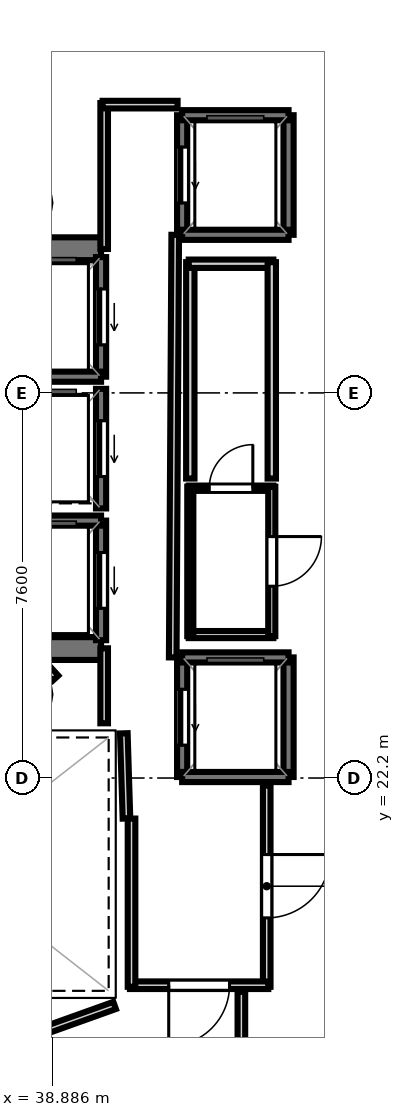
"""IFC4 building model, lengths in metres.
Left out: names, types, materials, properties, quantities, classifications, styles, units other than length and angle.
Written with IfcOpenShell. Run it as: python <this file> out.ifc"""

import sys

from ifc_helpers import new_model, si_unit, direction, frame, frame_2d, origin, place, context, subcontext, project, spatial, rectangle, extrude, element, fill, save


model = new_model("IFC4")
c1 = context("Model", 3, precision=1e-05, world=origin(), true_north=direction((0.0, 1.0)))
c2 = subcontext(c1, "Body", "Model", "MODEL_VIEW")
j1 = project(units=[si_unit("LENGTHUNIT", "METRE"), si_unit("PLANEANGLEUNIT", "RADIAN")], contexts=[c1])
p1 = place(None, origin())
s1 = spatial("IfcSite", under=j1, at=p1, CompositionType="ELEMENT")
p2 = place(p1, origin())
s2 = spatial("IfcBuilding", under=s1, at=p2, CompositionType="ELEMENT")
p3 = place(p2, frame((0.0, 0.0, 306.5)))
s3 = spatial("IfcBuildingStorey", under=s2, at=p3, CompositionType="ELEMENT", Elevation=306.5)
p4 = place(p3, frame((29.33, 32.645, 0.0), z_axis=(0.0, 0.0, 1.0), x_axis=(1.0, 0.0, 0.0)))
e1 = element("IfcWall", 1, at=p4, inside=s3, PredefinedType="SHEAR", context=c2, shape_type="SweptSolid", body=[
    extrude(rectangle(XDim=10.52, YDim=0.45, at=frame_2d((5.26, 0.0))), origin(), (0.0, 0.0, 1.0), 3.52),
])
p5 = place(p4, frame((0.895, 0.0, 0.0)))
e2 = element("IfcOpeningElement", 2, at=p5, cuts=e1, PredefinedType="OPENING", context=c2, shape_type="SweptSolid", body=[
    extrude(rectangle(XDim=1.25, YDim=2.15, at=frame_2d((0.625, 1.075))), frame((0.0, 0.235, 0.0), z_axis=(0.0, -1.0, 0.0), x_axis=(1.0, 0.0, 0.0)), (0.0, 0.0, 1.0), 0.47),
])
p6 = place(p3, frame((29.33, 24.755, 0.0), z_axis=(0.0, 0.0, 1.0), x_axis=(1.0, 0.0, 0.0)))
e3 = element("IfcWall", 3, at=p6, inside=s3, PredefinedType="SHEAR", context=c2, shape_type="SweptSolid", body=[
    extrude(rectangle(XDim=10.52, YDim=0.45, at=frame_2d((5.26, 0.0))), origin(), (0.0, 0.0, 1.0), 3.52),
])
p7 = place(p6, frame((0.695, 0.0, 0.0)))
e4 = element("IfcOpeningElement", 4, at=p7, cuts=e3, PredefinedType="OPENING", context=c2, shape_type="SweptSolid", body=[
    extrude(rectangle(XDim=1.25, YDim=2.15, at=frame_2d((0.625, 1.075))), frame((0.0, 0.235, 0.0), z_axis=(0.0, -1.0, 0.0), x_axis=(1.0, 0.0, 0.0)), (0.0, 0.0, 1.0), 0.47),
])
p8 = place(p3, frame((39.85, 30.12, 0.0), z_axis=(0.0, 0.0, 1.0), x_axis=(0.0, 1.0, 0.0)))
e5 = element("IfcWall", 5, at=p8, inside=s3, PredefinedType="SOLIDWALL", context=c2, shape_type="SweptSolid", body=[
    extrude(rectangle(XDim=2.36, YDim=0.2, at=frame_2d((1.18, 0.0))), origin(), (0.0, 0.0, 1.0), 3.52),
])
p9 = place(p8, frame((0.63, 0.0, 0.0)))
e6 = element("IfcOpeningElement", 6, at=p9, cuts=e5, PredefinedType="OPENING", context=c2, shape_type="SweptSolid", body=[
    extrude(rectangle(XDim=1.1, YDim=2.15, at=frame_2d((0.55, 1.075))), frame((0.0, 0.11, 0.0), z_axis=(0.0, -1.0, 0.0), x_axis=(1.0, 0.0, 0.0)), (0.0, 0.0, 1.0), 0.22),
])
p10 = place(p3, frame((37.75, 30.12, 0.0), z_axis=(0.0, 0.0, 1.0), x_axis=(1.0, 0.0, 0.0)))
e7 = element("IfcWall", 7, at=p10, inside=s3, PredefinedType="SOLIDWALL", context=c2, shape_type="SweptSolid", body=[
    extrude(rectangle(XDim=2.1, YDim=0.2, at=frame_2d((1.05, 0.0))), origin(), (0.0, 0.0, 1.0), 3.52),
])
p11 = place(p3, frame((39.85, 24.92, 0.0), z_axis=(0.0, 0.0, 1.0), x_axis=(0.0, 1.0, 0.0)))
e8 = element("IfcWall", 8, at=p11, inside=s3, PredefinedType="SOLIDWALL", context=c2, shape_type="SweptSolid", body=[
    extrude(rectangle(XDim=2.36, YDim=0.2, at=frame_2d((1.18, 0.0))), origin(), (0.0, 0.0, 1.0), 3.52),
])
p12 = place(p11, frame((0.63, 0.0, 0.0)))
e9 = element("IfcOpeningElement", 9, at=p12, cuts=e8, PredefinedType="OPENING", context=c2, shape_type="SweptSolid", body=[
    extrude(rectangle(XDim=1.1, YDim=2.15, at=frame_2d((0.55, 1.075))), frame((0.0, 0.11, 0.0), z_axis=(0.0, -1.0, 0.0), x_axis=(1.0, 0.0, 0.0)), (0.0, 0.0, 1.0), 0.22),
])
p13 = place(p3, frame((37.75, 27.28, 0.0), z_axis=(0.0, 0.0, 1.0), x_axis=(1.0, 0.0, 0.0)))
e10 = element("IfcWall", 10, at=p13, inside=s3, PredefinedType="SOLIDWALL", context=c2, shape_type="SweptSolid", body=[
    extrude(rectangle(XDim=2.1, YDim=0.2, at=frame_2d((1.05, 0.0))), origin(), (0.0, 0.0, 1.0), 3.52),
])
p14 = place(p3, frame((39.85, 27.52, 0.0), z_axis=(0.0, 0.0, 1.0), x_axis=(0.0, 1.0, 0.0)))
e11 = element("IfcWall", 11, at=p14, inside=s3, PredefinedType="SOLIDWALL", context=c2, shape_type="SweptSolid", body=[
    extrude(rectangle(XDim=2.36, YDim=0.2, at=frame_2d((1.18, 0.0))), origin(), (0.0, 0.0, 1.0), 3.52),
])
p15 = place(p14, frame((0.63, 0.0, 0.0)))
e12 = element("IfcOpeningElement", 12, at=p15, cuts=e11, PredefinedType="OPENING", context=c2, shape_type="SweptSolid", body=[
    extrude(rectangle(XDim=1.1, YDim=2.15, at=frame_2d((0.55, 1.075))), frame((0.0, 0.11, 0.0), z_axis=(0.0, -1.0, 0.0), x_axis=(1.0, 0.0, 0.0)), (0.0, 0.0, 1.0), 0.22),
])
p16 = place(p3, frame((43.55, 22.22, 0.0), z_axis=(0.0, 0.0, 1.0), x_axis=(0.0, 1.0, 0.0)))
e13 = element("IfcWall", 13, at=p16, inside=s3, PredefinedType="SOLIDWALL", context=c2, shape_type="SweptSolid", body=[
    extrude(rectangle(XDim=2.36, YDim=0.2, at=frame_2d((1.18, 0.0))), origin(), (0.0, 0.0, 1.0), 3.52),
])
p17 = place(p3, frame((41.45, 22.22, 0.0), z_axis=(0.0, 0.0, 1.0), x_axis=(0.0, 1.0, 0.0)))
e14 = element("IfcWall", 14, at=p17, inside=s3, PredefinedType="SOLIDWALL", context=c2, shape_type="SweptSolid", body=[
    extrude(rectangle(XDim=2.36, YDim=0.2, at=frame_2d((1.18, 0.0))), origin(), (0.0, 0.0, 1.0), 3.52),
])
p18 = place(p17, frame((0.63, 0.0, 0.0)))
e15 = element("IfcOpeningElement", 15, at=p18, cuts=e14, PredefinedType="OPENING", context=c2, shape_type="SweptSolid", body=[
    extrude(rectangle(XDim=1.1, YDim=2.15, at=frame_2d((0.55, 1.075))), frame((0.0, 0.11, 0.0), z_axis=(0.0, -1.0, 0.0), x_axis=(1.0, 0.0, 0.0)), (0.0, 0.0, 1.0), 0.22),
])
for number, where, z_axis, x_axis in (
    (16, (41.45, 24.58, 0.0), (0.0, 0.0, 1.0), (1.0, 0.0, 0.0)),
    (17, (41.45, 22.22, 0.0), (0.0, 0.0, 1.0), (1.0, 0.0, 0.0)),
):
    element("IfcWall", number, at=place(p3, frame(where, z_axis=z_axis, x_axis=x_axis)), inside=s3, PredefinedType="SOLIDWALL", context=c2, shape_type="SweptSolid", body=[
        extrude(rectangle(XDim=2.1, YDim=0.2, at=frame_2d((1.05, 0.0))), origin(), (0.0, 0.0, 1.0), 3.52),
    ])
p19 = place(p3, frame((43.55, 32.92, 0.0), z_axis=(0.0, 0.0, 1.0), x_axis=(0.0, 1.0, 0.0)))
e18 = element("IfcWall", 18, at=p19, inside=s3, PredefinedType="SOLIDWALL", context=c2, shape_type="SweptSolid", body=[
    extrude(rectangle(XDim=2.36, YDim=0.2, at=frame_2d((1.18, 0.0))), origin(), (0.0, 0.0, 1.0), 3.52),
])
p20 = place(p3, frame((41.45, 32.92, 0.0), z_axis=(0.0, 0.0, 1.0), x_axis=(0.0, 1.0, 0.0)))
e19 = element("IfcWall", 19, at=p20, inside=s3, PredefinedType="SOLIDWALL", context=c2, shape_type="SweptSolid", body=[
    extrude(rectangle(XDim=2.36, YDim=0.2, at=frame_2d((1.18, 0.0))), origin(), (0.0, 0.0, 1.0), 3.52),
])
p21 = place(p20, frame((0.63, 0.0, 0.0)))
e20 = element("IfcOpeningElement", 20, at=p21, cuts=e19, PredefinedType="OPENING", context=c2, shape_type="SweptSolid", body=[
    extrude(rectangle(XDim=1.1, YDim=2.15, at=frame_2d((0.55, 1.075))), frame((0.0, 0.11, 0.0), z_axis=(0.0, -1.0, 0.0), x_axis=(1.0, 0.0, 0.0)), (0.0, 0.0, 1.0), 0.22),
])
for number, where, z_axis, x_axis in (
    (21, (41.45, 35.28, 0.0), (0.0, 0.0, 1.0), (1.0, 0.0, 0.0)),
    (22, (41.45, 32.92, 0.0), (0.0, 0.0, 1.0), (1.0, 0.0, 0.0)),
):
    element("IfcWall", number, at=place(p3, frame(where, z_axis=z_axis, x_axis=x_axis)), inside=s3, PredefinedType="SOLIDWALL", context=c2, shape_type="SweptSolid", body=[
        extrude(rectangle(XDim=2.1, YDim=0.2, at=frame_2d((1.05, 0.0))), origin(), (0.0, 0.0, 1.0), 3.52),
    ])
p22 = place(p3, frame((40.351, 21.401, 0.0), z_axis=(0.0, 0.0, 1.0), x_axis=(-0.031058045979, 0.999517582527, 0.0)))
e23 = element("IfcWall", 23, at=p22, inside=s3, PredefinedType="PARTITIONING", context=c2, shape_type="SweptSolid", body=[
    extrude(rectangle(XDim=1.682, YDim=0.15, at=frame_2d((0.841, 0.0))), origin(), (0.0, 0.0, 1.0), 2.84),
])
p23 = place(p3, frame((39.911, 23.28, 0.0), z_axis=(0.0, 0.0, 1.0), x_axis=(0.0, 1.0, 0.0)))
e24 = element("IfcWall", 24, at=p23, inside=s3, PredefinedType="PARTITIONING", context=c2, shape_type="SweptSolid", body=[
    extrude(rectangle(XDim=1.48, YDim=0.15, at=frame_2d((0.74, 0.0))), origin(), (0.0, 0.0, 1.0), 2.84),
])
p24 = place(p3, frame((39.911, 32.64, 0.0), z_axis=(0.0, 0.0, 1.0), x_axis=(0.0, 1.0, 0.0)))
e25 = element("IfcWall", 25, at=p24, inside=s3, PredefinedType="PARTITIONING", context=c2, shape_type="SweptSolid", body=[
    extrude(rectangle(XDim=2.88, YDim=0.15, at=frame_2d((1.44, 0.0))), origin(), (0.0, 0.0, 1.0), 2.84),
])
p25 = place(p3, frame((39.88, 35.489, 0.0), z_axis=(0.0, 0.0, 1.0), x_axis=(1.0, 0.0, 0.0)))
e26 = element("IfcWall", 26, at=p25, inside=s3, PredefinedType="PARTITIONING", context=c2, shape_type="SweptSolid", body=[
    extrude(rectangle(XDim=1.48, YDim=0.15, at=frame_2d((0.74, 0.0))), origin(), (0.0, 0.0, 1.0), 2.84),
])
p26 = place(p3, frame((41.313, 32.92, 0.0), z_axis=(0.0, 0.0, 1.0), x_axis=(-0.005942518022, -0.999982343084, 0.0)))
e27 = element("IfcWall", 27, at=p26, inside=s3, PredefinedType="PARTITIONING", context=c2, shape_type="SweptSolid", body=[
    extrude(rectangle(XDim=8.34, YDim=0.15, at=frame_2d((4.17, 0.0))), origin(), (0.0, 0.0, 1.0), 2.84),
])
p27 = place(p3, frame((43.119, 22.05, 0.0), z_axis=(0.0, 0.0, 1.0), x_axis=(0.0, -1.0, 0.0)))
e28 = element("IfcWall", 28, at=p27, inside=s3, PredefinedType="PARTITIONING", context=c2, shape_type="SweptSolid", body=[
    extrude(rectangle(XDim=3.97, YDim=0.15, at=frame_2d((1.985, 0.0))), origin(), (0.0, 0.0, 1.0), 2.84),
])
p28 = place(p27, frame((1.36, 0.0, 0.0)))
e29 = element("IfcOpeningElement", 29, at=p28, cuts=e28, PredefinedType="OPENING", context=c2, shape_type="SweptSolid", body=[
    extrude(rectangle(XDim=1.25, YDim=2.2, at=frame_2d((0.625, 1.1))), frame((0.0, 0.085, 0.0), z_axis=(0.0, -1.0, 0.0), x_axis=(1.0, 0.0, 0.0)), (0.0, 0.0, 1.0), 0.17),
])
p29 = place(p3, frame((43.15, 18.111, 0.0), z_axis=(0.0, 0.0, 1.0), x_axis=(-1.0, 0.0, 0.0)))
e30 = element("IfcWall", 30, at=p29, inside=s3, PredefinedType="PARTITIONING", context=c2, shape_type="SweptSolid", body=[
    extrude(rectangle(XDim=2.73, YDim=0.15, at=frame_2d((1.365, 0.0))), origin(), (0.0, 0.0, 1.0), 2.84),
])
p30 = place(p29, frame((0.765, 0.0, 0.0)))
e31 = element("IfcOpeningElement", 31, at=p30, cuts=e30, PredefinedType="OPENING", context=c2, shape_type="SweptSolid", body=[
    extrude(rectangle(XDim=1.2, YDim=2.15, at=frame_2d((0.6, 1.075))), frame((0.0, 0.085, 0.0), z_axis=(0.0, -1.0, 0.0), x_axis=(1.0, 0.0, 0.0)), (0.0, 0.0, 1.0), 0.17),
])
p31 = place(p3, frame((40.451, 18.08, 0.0), z_axis=(0.0, 0.0, 1.0), x_axis=(0.0, 1.0, 0.0)))
e32 = element("IfcWall", 32, at=p31, inside=s3, PredefinedType="PARTITIONING", context=c2, shape_type="SweptSolid", body=[
    extrude(rectangle(XDim=3.32, YDim=0.15, at=frame_2d((1.66, 0.0))), origin(), (0.0, 0.0, 1.0), 2.84),
])
p32 = place(p3, frame((43.25, 25.031, 0.0), z_axis=(0.0, 0.0, 1.0), x_axis=(-1.0, 0.0, 0.0)))
e33 = element("IfcWall", 33, at=p32, inside=s3, PredefinedType="PARTITIONING", context=c2, shape_type="SweptSolid", body=[
    extrude(rectangle(XDim=1.67, YDim=0.14, at=frame_2d((0.835, 0.0))), origin(), (0.0, 0.0, 1.0), 2.84),
])
p33 = place(p3, frame((41.611, 25.0, 0.0), z_axis=(0.0, 0.0, 1.0), x_axis=(0.0, 1.0, 0.0)))
e34 = element("IfcWall", 34, at=p33, inside=s3, PredefinedType="PARTITIONING", context=c2, shape_type="SweptSolid", body=[
    extrude(rectangle(XDim=2.95, YDim=0.12, at=frame_2d((1.475, 0.0))), origin(), (0.0, 0.0, 1.0), 2.84),
])
p34 = place(p3, frame((41.58, 27.919, 0.0), z_axis=(0.0, 0.0, 1.0), x_axis=(1.0, 0.0, 0.0)))
e35 = element("IfcWall", 35, at=p34, inside=s3, PredefinedType="PARTITIONING", context=c2, shape_type="SweptSolid", body=[
    extrude(rectangle(XDim=1.67, YDim=0.105, at=frame_2d((0.835, 0.0))), origin(), (0.0, 0.0, 1.0), 2.84),
])
p35 = place(p34, frame((0.405, 0.0, 0.0)))
e36 = element("IfcOpeningElement", 36, at=p35, cuts=e35, PredefinedType="OPENING", context=c2, shape_type="SweptSolid", body=[
    extrude(rectangle(XDim=0.86, YDim=2.05, at=frame_2d((0.43, 1.025))), frame((0.0, 0.062, 0.0), z_axis=(0.0, -1.0, 0.0), x_axis=(1.0, 0.0, 0.0)), (0.0, 0.0, 1.0), 0.125),
])
p36 = place(p3, frame((43.219, 27.95, 0.0), z_axis=(0.0, 0.0, 1.0), x_axis=(0.0, -1.0, 0.0)))
e37 = element("IfcWall", 37, at=p36, inside=s3, PredefinedType="PARTITIONING", context=c2, shape_type="SweptSolid", body=[
    extrude(rectangle(XDim=2.95, YDim=0.14, at=frame_2d((1.475, 0.0))), origin(), (0.0, 0.0, 1.0), 2.84),
])
p37 = place(p36, frame((0.985, 0.0, 0.0)))
e38 = element("IfcOpeningElement", 38, at=p37, cuts=e37, PredefinedType="OPENING", context=c2, shape_type="SweptSolid", body=[
    extrude(rectangle(XDim=0.98, YDim=2.1, at=frame_2d((0.49, 1.05))), frame((0.0, 0.08, 0.0), z_axis=(0.0, -1.0, 0.0), x_axis=(1.0, 0.0, 0.0)), (0.0, 0.0, 1.0), 0.16),
])
p38 = place(p3, frame((41.611, 28.11, 0.0), z_axis=(0.0, 0.0, 1.0), x_axis=(0.0, 1.0, 0.0)))
e39 = element("IfcWall", 39, at=p38, inside=s3, PredefinedType="PLUMBINGWALL", context=c2, shape_type="SweptSolid", body=[
    extrude(rectangle(XDim=4.27, YDim=0.165, at=frame_2d((2.135, 0.0))), origin(), (0.0, 0.0, 1.0), 2.84),
])
p39 = place(p3, frame((41.58, 32.349, 0.0), z_axis=(0.0, 0.0, 1.0), x_axis=(1.0, 0.0, 0.0)))
e40 = element("IfcWall", 40, at=p39, inside=s3, PredefinedType="PLUMBINGWALL", context=c2, shape_type="SweptSolid", body=[
    extrude(rectangle(XDim=1.67, YDim=0.165, at=frame_2d((0.835, 0.0))), origin(), (0.0, 0.0, 1.0), 2.84),
])
p40 = place(p3, frame((43.219, 32.38, 0.0), z_axis=(0.0, 0.0, 1.0), x_axis=(0.0, -1.0, 0.0)))
e41 = element("IfcWall", 41, at=p40, inside=s3, PredefinedType="PLUMBINGWALL", context=c2, shape_type="SweptSolid", body=[
    extrude(rectangle(XDim=4.27, YDim=0.165, at=frame_2d((2.135, 0.0))), origin(), (0.0, 0.0, 1.0), 2.84),
])
p41 = place(p3, frame((38.951, 24.171, 0.0), z_axis=(0.0, 0.0, 1.0), x_axis=(-0.674186852077, 0.738560822469, 0.0)))
e42 = element("IfcWall", 42, at=p41, inside=s3, PredefinedType="PARTITIONING", context=c2, shape_type="SweptSolid", body=[
    extrude(rectangle(XDim=0.281, YDim=0.15, at=frame_2d((0.14, 0.0))), origin(), (0.0, 0.0, 1.0), 2.84),
])
p42 = place(p3, frame((36.81, 16.529, 0.0), z_axis=(0.0, 0.0, 1.0), x_axis=(0.941548344365, 0.33687789364, 0.0)))
e43 = element("IfcWall", 43, at=p42, inside=s3, PredefinedType="PARTITIONING", context=c2, shape_type="SweptSolid", body=[
    extrude(rectangle(XDim=3.513, YDim=0.15, at=frame_2d((1.756, 0.0))), origin(), (0.0, 0.0, 1.0), 2.84),
])
p43 = place(p3, frame((42.619, 17.98, 0.0), z_axis=(0.0, 0.0, 1.0), x_axis=(0.0, -1.0, 0.0)))
e44 = element("IfcWall", 44, at=p43, inside=s3, PredefinedType="PARTITIONING", context=c2, shape_type="SweptSolid", body=[
    extrude(rectangle(XDim=1.93, YDim=0.15, at=frame_2d((0.965, 0.0))), origin(), (0.0, 0.0, 1.0), 2.84),
])
p44 = place(p9, origin())
e45 = element("IfcDoor", 45, at=p44, inside=s3, OperationType="SLIDING_TO_LEFT", PredefinedType="DOOR", context=c2, shape_type="SweptSolid", body=[
    extrude(rectangle(XDim=1.1, YDim=2.15, at=frame_2d((0.55, 1.075))), frame((0.0, 0.025, 0.0), z_axis=(0.0, -1.0, 0.0), x_axis=(1.0, 0.0, 0.0)), (0.0, 0.0, 1.0), 0.05),
])
fill(e6, e45)
p45 = place(p12, origin())
e46 = element("IfcDoor", 46, at=p45, inside=s3, OperationType="SLIDING_TO_LEFT", PredefinedType="DOOR", context=c2, shape_type="SweptSolid", body=[
    extrude(rectangle(XDim=1.1, YDim=2.15, at=frame_2d((0.55, 1.075))), frame((0.0, 0.025, 0.0), z_axis=(0.0, -1.0, 0.0), x_axis=(1.0, 0.0, 0.0)), (0.0, 0.0, 1.0), 0.05),
])
fill(e9, e46)
p46 = place(p15, origin())
e47 = element("IfcDoor", 47, at=p46, inside=s3, OperationType="SLIDING_TO_LEFT", PredefinedType="DOOR", context=c2, shape_type="SweptSolid", body=[
    extrude(rectangle(XDim=1.1, YDim=2.15, at=frame_2d((0.55, 1.075))), frame((0.0, 0.025, 0.0), z_axis=(0.0, -1.0, 0.0), x_axis=(1.0, 0.0, 0.0)), (0.0, 0.0, 1.0), 0.05),
])
fill(e12, e47)
p47 = place(p18, origin())
e48 = element("IfcDoor", 48, at=p47, inside=s3, OperationType="SLIDING_TO_LEFT", PredefinedType="DOOR", context=c2, shape_type="SweptSolid", body=[
    extrude(rectangle(XDim=1.1, YDim=2.15, at=frame_2d((0.55, 1.075))), frame((0.0, 0.025, 0.0), z_axis=(0.0, -1.0, 0.0), x_axis=(1.0, 0.0, 0.0)), (0.0, 0.0, 1.0), 0.05),
])
fill(e15, e48)
p48 = place(p21, origin())
e49 = element("IfcDoor", 49, at=p48, inside=s3, OperationType="SLIDING_TO_LEFT", PredefinedType="DOOR", context=c2, shape_type="SweptSolid", body=[
    extrude(rectangle(XDim=1.1, YDim=2.15, at=frame_2d((0.55, 1.075))), frame((0.0, 0.025, 0.0), z_axis=(0.0, -1.0, 0.0), x_axis=(1.0, 0.0, 0.0)), (0.0, 0.0, 1.0), 0.05),
])
fill(e20, e49)
p49 = place(p30, origin())
e50 = element("IfcDoor", 50, at=p49, inside=s3, OperationType="SINGLE_SWING_RIGHT", PredefinedType="DOOR", context=c2, shape_type="SweptSolid", body=[
    extrude(rectangle(XDim=1.2, YDim=2.15, at=frame_2d((0.6, 1.075))), frame((0.0, 0.025, 0.0), z_axis=(0.0, -1.0, 0.0), x_axis=(1.0, 0.0, 0.0)), (0.0, 0.0, 1.0), 0.05),
])
fill(e31, e50)
p50 = place(p28, origin())
e51 = element("IfcDoor", 51, at=p50, inside=s3, OperationType="SINGLE_SWING_LEFT", PredefinedType="DOOR", context=c2, shape_type="SweptSolid", body=[
    extrude(rectangle(XDim=1.25, YDim=2.2, at=frame_2d((0.625, 1.1))), frame((0.0, 0.025, 0.0), z_axis=(0.0, -1.0, 0.0), x_axis=(1.0, 0.0, 0.0)), (0.0, 0.0, 1.0), 0.05),
])
fill(e29, e51)
p51 = place(p37, origin())
e52 = element("IfcDoor", 52, at=p51, inside=s3, OperationType="SINGLE_SWING_LEFT", PredefinedType="DOOR", context=c2, shape_type="SweptSolid", body=[
    extrude(rectangle(XDim=0.98, YDim=2.1, at=frame_2d((0.49, 1.05))), frame((0.0, 0.025, 0.0), z_axis=(0.0, -1.0, 0.0), x_axis=(1.0, 0.0, 0.0)), (0.0, 0.0, 1.0), 0.05),
])
fill(e38, e52)
p52 = place(p35, origin())
e53 = element("IfcDoor", 53, at=p52, inside=s3, OperationType="SINGLE_SWING_RIGHT", PredefinedType="DOOR", context=c2, shape_type="SweptSolid", body=[
    extrude(rectangle(XDim=0.86, YDim=2.05, at=frame_2d((0.43, 1.025))), frame((0.0, 0.025, 0.0), z_axis=(0.0, -1.0, 0.0), x_axis=(1.0, 0.0, 0.0)), (0.0, 0.0, 1.0), 0.05),
])
fill(e36, e53)
save(model, sys.argv[1])
